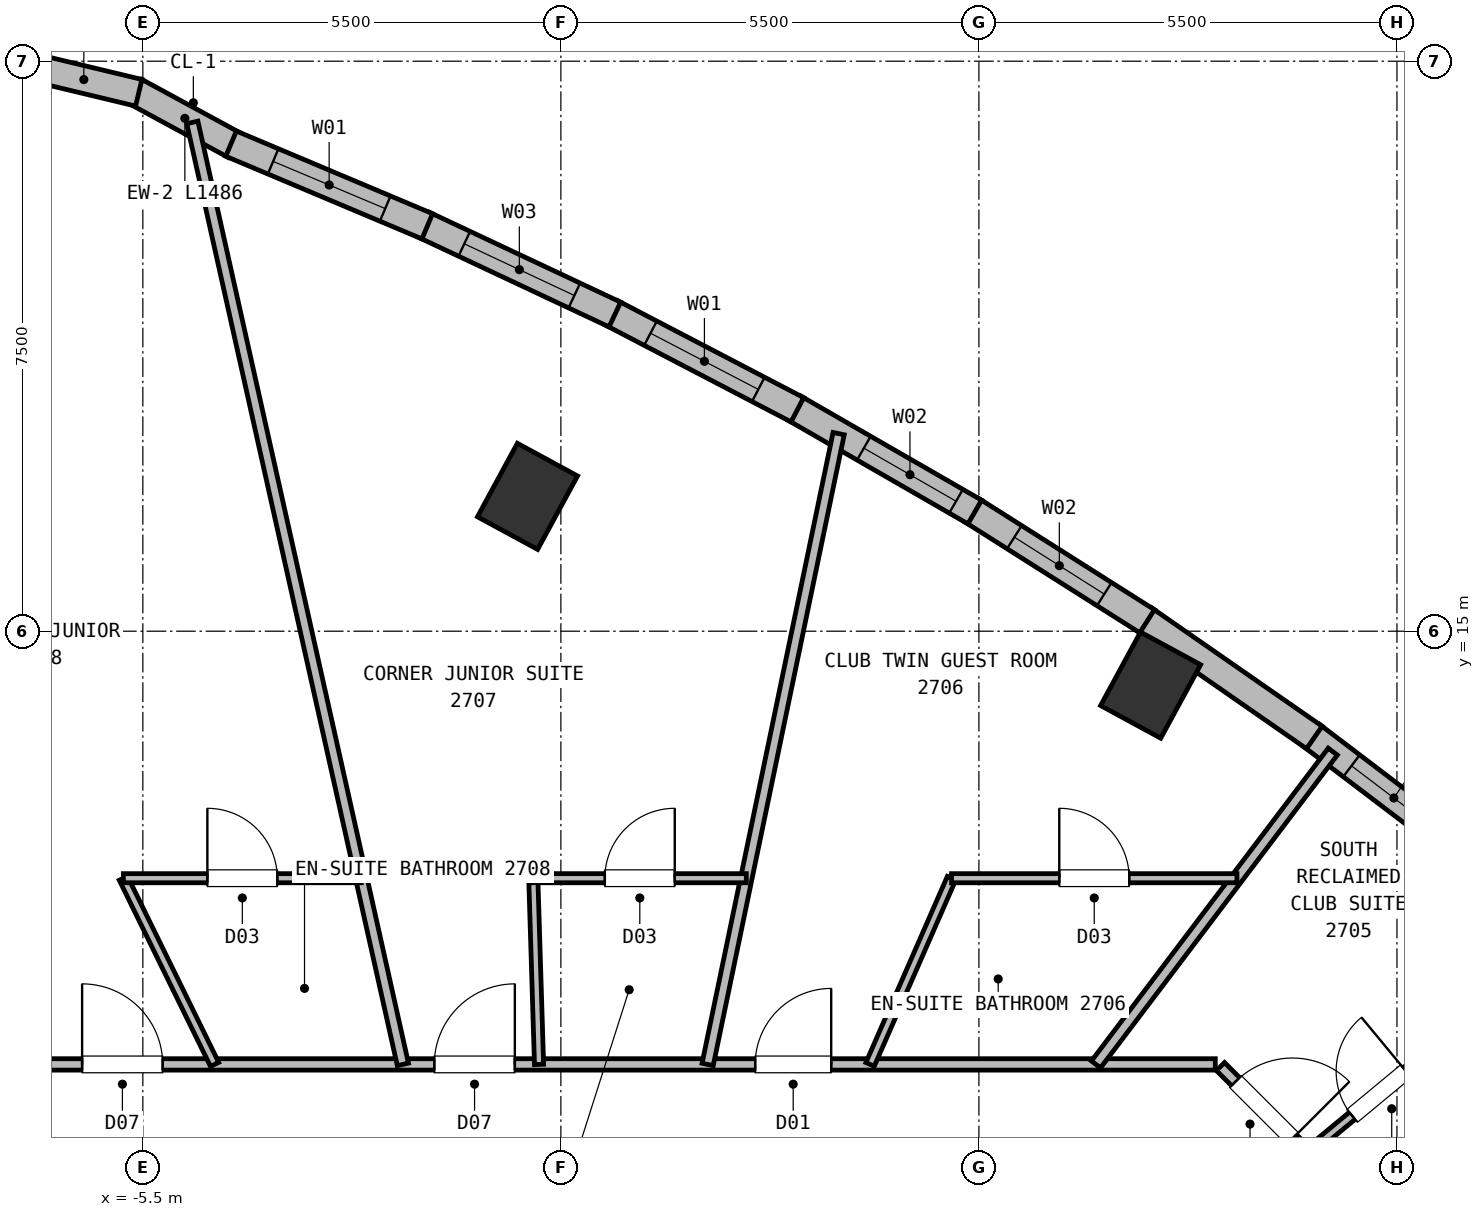
"""IFC4 building model, lengths in metres.
Left out: names, types, materials, properties, quantities, classifications, styles, units other than length and angle.
Written with IfcOpenShell. Run it as: python <this file> out.ifc"""

import sys

from ifc_helpers import new_model, si_unit, direction, frame, frame_2d, origin, origin_2d, place, context, subcontext, project, spatial, rectangle, extrude, element, fill, save


model = new_model("IFC4")
c1 = context("Model", 3, precision=1e-05, world=origin(), true_north=direction((0.0, 1.0)))
c2 = subcontext(c1, "Body", "Model", "MODEL_VIEW")
j1 = project(units=[si_unit("LENGTHUNIT", "METRE"), si_unit("PLANEANGLEUNIT", "RADIAN")], contexts=[c1])
p1 = place(None, origin())
s1 = spatial("IfcSite", under=j1, at=p1, CompositionType="ELEMENT")
p2 = place(p1, origin())
s2 = spatial("IfcBuilding", under=s1, at=p2, CompositionType="ELEMENT")
p3 = place(p2, frame((0.0, 0.0, 101.0)))
s3 = spatial("IfcBuildingStorey", under=s2, at=p3, CompositionType="ELEMENT", Elevation=101.0)
for number, where, z_axis, x_axis in (
    (1, (7.759, 14.29, 0.0), (0.0, 0.0, 1.0), (-0.879, 0.477, 0.0)),
    (2, (-0.439, 16.774, 0.0), (0.0, 0.0, 1.0), (-0.879, 0.477, 0.0)),
):
    element("IfcColumn", number, at=place(p3, frame(where, z_axis=z_axis, x_axis=x_axis)), inside=s3, PredefinedType="COLUMN", context=c2, shape_type="SweptSolid", body=[
        extrude(rectangle(XDim=0.9, YDim=1.1, at=origin_2d()), origin(), (0.0, 0.0, 1.0), 3.75),
    ])
for number, where, z_axis, x_axis in (
    (3, (-5.6, 22.102, 0.0), (0.0, 0.0, 1.0), (0.879, -0.477, 0.0)),
    (4, (-6.999, 22.431, 0.0), (0.0, 0.0, 1.0), (0.972, -0.233, 0.0)),
):
    element("IfcWall", number, at=place(p3, frame(where, z_axis=z_axis, x_axis=x_axis)), inside=s3, PredefinedType="SOLIDWALL", context=c2, shape_type="SweptSolid", body=[
        extrude(rectangle(XDim=1.486, YDim=0.36, at=frame_2d((0.743, 0.0))), origin(), (0.0, 0.0, 1.0), 3.5),
    ])
p4 = place(p3, frame((9.873, 13.631, 0.0), z_axis=(0.0, 0.0, 1.0), x_axis=(0.796336225349, -0.604854210696, 0.0)))
e5 = element("IfcWall", 5, at=p4, inside=s3, PredefinedType="SOLIDWALL", context=c2, shape_type="SweptSolid", body=[
    extrude(rectangle(XDim=2.73, YDim=0.36, at=frame_2d((1.365, 0.0))), origin(), (0.0, 0.0, 1.0), 3.5),
])
p5 = place(p4, frame((0.665, 0.0, 0.72)))
e6 = element("IfcOpeningElement", 6, at=p5, cuts=e5, PredefinedType="OPENING", context=c2, shape_type="SweptSolid", body=[
    extrude(rectangle(XDim=1.4, YDim=1.84, at=frame_2d((0.7, 0.92))), frame((0.0, 0.19, 0.0), z_axis=(0.0, -1.0, 0.0), x_axis=(1.0, 0.0, 0.0)), (0.0, 0.0, 1.0), 0.38),
])
p6 = place(p3, frame((7.671, 15.159, 0.0), z_axis=(0.0, 0.0, 1.0), x_axis=(0.821331552378, -0.570451120665, 0.0)))
e7 = element("IfcWall", 7, at=p6, inside=s3, PredefinedType="SOLIDWALL", context=c2, shape_type="SweptSolid", body=[
    extrude(rectangle(XDim=2.73, YDim=0.36, at=frame_2d((1.365, 0.0))), origin(), (0.0, 0.0, 1.0), 3.5),
])
p7 = place(p3, frame((5.403, 16.594, 0.0), z_axis=(0.0, 0.0, 1.0), x_axis=(0.844802931873, -0.535077570357, 0.0)))
e8 = element("IfcWall", 8, at=p7, inside=s3, PredefinedType="SOLIDWALL", context=c2, shape_type="SweptSolid", body=[
    extrude(rectangle(XDim=2.734, YDim=0.36, at=frame_2d((1.367, 0.0))), origin(), (0.0, 0.0, 1.0), 3.5),
])
p8 = place(p7, frame((0.667, 0.0, 0.72)))
e9 = element("IfcOpeningElement", 9, at=p8, cuts=e8, PredefinedType="OPENING", context=c2, shape_type="SweptSolid", body=[
    extrude(rectangle(XDim=1.4, YDim=1.84, at=frame_2d((0.7, 0.92))), frame((0.0, 0.19, 0.0), z_axis=(0.0, -1.0, 0.0), x_axis=(1.0, 0.0, 0.0)), (0.0, 0.0, 1.0), 0.38),
])
p9 = place(p3, frame((3.068, 17.938, 0.0), z_axis=(0.0, 0.0, 1.0), x_axis=(0.866601472799, -0.499000889121, 0.0)))
e10 = element("IfcWall", 10, at=p9, inside=s3, PredefinedType="SOLIDWALL", context=c2, shape_type="SweptSolid", body=[
    extrude(rectangle(XDim=2.744, YDim=0.36, at=frame_2d((1.372, 0.0))), origin(), (0.0, 0.0, 1.0), 3.5),
])
p10 = place(p9, frame((1.06, 0.0, 0.72)))
e11 = element("IfcOpeningElement", 11, at=p10, cuts=e10, PredefinedType="OPENING", context=c2, shape_type="SweptSolid", body=[
    extrude(rectangle(XDim=1.4, YDim=1.84, at=frame_2d((0.7, 0.92))), frame((0.0, 0.19, 0.0), z_axis=(0.0, -1.0, 0.0), x_axis=(1.0, 0.0, 0.0)), (0.0, 0.0, 1.0), 0.38),
])
p11 = place(p3, frame((0.666, 19.189, 0.0), z_axis=(0.0, 0.0, 1.0), x_axis=(0.886704748188, -0.462336121822, 0.0)))
e12 = element("IfcWall", 12, at=p11, inside=s3, PredefinedType="SOLIDWALL", context=c2, shape_type="SweptSolid", body=[
    extrude(rectangle(XDim=2.759, YDim=0.36, at=frame_2d((1.379, 0.0))), origin(), (0.0, 0.0, 1.0), 3.5),
])
p12 = place(p11, frame((0.579, 0.0, 0.72)))
e13 = element("IfcOpeningElement", 13, at=p12, cuts=e12, PredefinedType="OPENING", context=c2, shape_type="SweptSolid", body=[
    extrude(rectangle(XDim=1.6, YDim=1.88, at=frame_2d((0.8, 0.94))), frame((0.0, 0.19, 0.0), z_axis=(0.0, -1.0, 0.0), x_axis=(1.0, 0.0, 0.0)), (0.0, 0.0, 1.0), 0.38),
])
p13 = place(p3, frame((-1.803, 20.348, 0.0), z_axis=(0.0, 0.0, 1.0), x_axis=(0.905061598697, -0.425280498688, 0.0)))
e14 = element("IfcWall", 14, at=p13, inside=s3, PredefinedType="SOLIDWALL", context=c2, shape_type="SweptSolid", body=[
    extrude(rectangle(XDim=2.777, YDim=0.36, at=frame_2d((1.389, 0.0))), origin(), (0.0, 0.0, 1.0), 3.5),
])
p14 = place(p13, frame((0.589, 0.0, 0.72)))
e15 = element("IfcOpeningElement", 15, at=p14, cuts=e14, PredefinedType="OPENING", context=c2, shape_type="SweptSolid", body=[
    extrude(rectangle(XDim=1.6, YDim=1.88, at=frame_2d((0.8, 0.94))), frame((0.0, 0.19, 0.0), z_axis=(0.0, -1.0, 0.0), x_axis=(1.0, 0.0, 0.0)), (0.0, 0.0, 1.0), 0.38),
])
p15 = place(p3, frame((-4.339, 21.415, 0.0), z_axis=(0.0, 0.0, 1.0), x_axis=(0.921579586259, -0.388189472025, 0.0)))
e16 = element("IfcWall", 16, at=p15, inside=s3, PredefinedType="SOLIDWALL", context=c2, shape_type="SweptSolid", body=[
    extrude(rectangle(XDim=2.801, YDim=0.36, at=frame_2d((1.401, 0.0))), origin(), (0.0, 0.0, 1.0), 3.5),
])
p16 = place(p15, frame((0.601, 0.0, 0.72)))
e17 = element("IfcOpeningElement", 17, at=p16, cuts=e16, PredefinedType="OPENING", context=c2, shape_type="SweptSolid", body=[
    extrude(rectangle(XDim=1.6, YDim=1.88, at=frame_2d((0.8, 0.94))), frame((0.0, 0.19, 0.0), z_axis=(0.0, -1.0, 0.0), x_axis=(1.0, 0.0, 0.0)), (0.0, 0.0, 1.0), 0.38),
])
p17 = place(p3, frame((8.678, 9.272, 0.0), z_axis=(0.0, 0.0, 1.0), x_axis=(0.707106781187, -0.707106781187, 0.0)))
e18 = element("IfcWall", 18, at=p17, inside=s3, PredefinedType="PARTITIONING", context=c2, shape_type="SweptSolid", body=[
    extrude(rectangle(XDim=2.89, YDim=0.15, at=frame_2d((1.445, 0.0))), origin(), (0.0, 0.0, 1.0), 3.5),
])
p18 = place(p17, frame((0.28, 0.0, 0.0)))
e19 = element("IfcOpeningElement", 19, at=p18, cuts=e18, PredefinedType="OPENING", context=c2, shape_type="SweptSolid", body=[
    extrude(rectangle(XDim=1.06, YDim=2.15, at=frame_2d((0.53, 1.075))), frame((0.0, 0.085, 0.0), z_axis=(0.0, -1.0, 0.0), x_axis=(1.0, 0.0, 0.0)), (0.0, 0.0, 1.0), 0.17),
])
p19 = place(p3, frame((-8.61, 9.3, 0.0), z_axis=(0.0, 0.0, 1.0), x_axis=(1.0, 0.0, 0.0)))
e20 = element("IfcWall", 20, at=p19, inside=s3, PredefinedType="PARTITIONING", context=c2, shape_type="SweptSolid", body=[
    extrude(rectangle(XDim=17.22, YDim=0.15, at=frame_2d((8.61, 0.0))), origin(), (0.0, 0.0, 1.0), 3.5),
])
p20 = place(p19, frame((11.167, 0.0, 0.0)))
e21 = element("IfcOpeningElement", 21, at=p20, cuts=e20, PredefinedType="OPENING", context=c2, shape_type="SweptSolid", body=[
    extrude(rectangle(XDim=1.0, YDim=2.15, at=frame_2d((0.5, 1.075))), frame((0.0, 0.085, 0.0), z_axis=(0.0, -1.0, 0.0), x_axis=(1.0, 0.0, 0.0)), (0.0, 0.0, 1.0), 0.17),
])
p21 = place(p19, frame((6.944, 0.0, 0.0)))
e22 = element("IfcOpeningElement", 22, at=p21, cuts=e20, PredefinedType="OPENING", context=c2, shape_type="SweptSolid", body=[
    extrude(rectangle(XDim=1.06, YDim=2.15, at=frame_2d((0.53, 1.075))), frame((0.0, 0.085, 0.0), z_axis=(0.0, -1.0, 0.0), x_axis=(1.0, 0.0, 0.0)), (0.0, 0.0, 1.0), 0.17),
])
p22 = place(p19, frame((2.311, 0.0, 0.0)))
e23 = element("IfcOpeningElement", 23, at=p22, cuts=e20, PredefinedType="OPENING", context=c2, shape_type="SweptSolid", body=[
    extrude(rectangle(XDim=1.06, YDim=2.15, at=frame_2d((0.53, 1.075))), frame((0.0, 0.085, 0.0), z_axis=(0.0, -1.0, 0.0), x_axis=(1.0, 0.0, 0.0)), (0.0, 0.0, 1.0), 0.17),
])
p23 = place(p3, frame((9.818, 8.132, 0.0), z_axis=(0.0, 0.0, 1.0), x_axis=(0.770088402747, 0.63793718496, 0.0)))
e24 = element("IfcWall", 24, at=p23, inside=s3, PredefinedType="PARTITIONING", context=c2, shape_type="SweptSolid", body=[
    extrude(rectangle(XDim=2.461, YDim=0.12, at=frame_2d((1.23, 0.0))), origin(), (0.0, 0.0, 1.0), 3.5),
])
p24 = place(p23, frame((0.771, 0.0, 0.0)))
e25 = element("IfcOpeningElement", 25, at=p24, cuts=e24, PredefinedType="OPENING", context=c2, shape_type="SweptSolid", body=[
    extrude(rectangle(XDim=0.92, YDim=2.1, at=frame_2d((0.46, 1.05))), frame((0.0, 0.07, 0.0), z_axis=(0.0, -1.0, 0.0), x_axis=(1.0, 0.0, 0.0)), (0.0, 0.0, 1.0), 0.14),
])
p25 = place(p3, frame((7.04, 9.3, 0.0), z_axis=(0.0, 0.0, 1.0), x_axis=(0.603580834167, 0.797301810249, 0.0)))
e26 = element("IfcWall", 26, at=p25, inside=s3, PredefinedType="PARTITIONING", context=c2, shape_type="SweptSolid", body=[
    extrude(rectangle(XDim=5.162, YDim=0.15, at=frame_2d((2.581, 0.0))), origin(), (0.0, 0.0, 1.0), 3.5),
])
p26 = place(p3, frame((4.068, 9.3, 0.0), z_axis=(0.0, 0.0, 1.0), x_axis=(0.400794887066, 0.916167811322, 0.0)))
e27 = element("IfcWall", 27, at=p26, inside=s3, PredefinedType="PARTITIONING", context=c2, shape_type="SweptSolid", body=[
    extrude(rectangle(XDim=2.674, YDim=0.12, at=frame_2d((1.337, 0.0))), origin(), (0.0, 0.0, 1.0), 3.5),
])
p27 = place(p3, frame((5.14, 11.75, 0.0), z_axis=(0.0, 0.0, 1.0), x_axis=(1.0, 0.0, 0.0)))
e28 = element("IfcWall", 28, at=p27, inside=s3, PredefinedType="PARTITIONING", context=c2, shape_type="SweptSolid", body=[
    extrude(rectangle(XDim=3.755, YDim=0.12, at=frame_2d((1.877, 0.0))), origin(), (0.0, 0.0, 1.0), 3.5),
])
p28 = place(p27, frame((1.417, 0.0, 0.0)))
e29 = element("IfcOpeningElement", 29, at=p28, cuts=e28, PredefinedType="OPENING", context=c2, shape_type="SweptSolid", body=[
    extrude(rectangle(XDim=0.92, YDim=2.1, at=frame_2d((0.46, 1.05))), frame((0.0, 0.07, 0.0), z_axis=(0.0, -1.0, 0.0), x_axis=(1.0, 0.0, 0.0)), (0.0, 0.0, 1.0), 0.14),
])
p29 = place(p3, frame((1.931, 9.3, 0.0), z_axis=(0.0, 0.0, 1.0), x_axis=(0.203305542184, 0.979115343827, 0.0)))
e30 = element("IfcWall", 30, at=p29, inside=s3, PredefinedType="PARTITIONING", context=c2, shape_type="SweptSolid", body=[
    extrude(rectangle(XDim=8.477, YDim=0.15, at=frame_2d((4.238, 0.0))), origin(), (0.0, 0.0, 1.0), 3.5),
])
p30 = place(p3, frame((-0.287, 9.3, 0.0), z_axis=(0.0, 0.0, 1.0), x_axis=(-0.030877148781, 0.999523187166, 0.0)))
e31 = element("IfcWall", 31, at=p30, inside=s3, PredefinedType="PARTITIONING", context=c2, shape_type="SweptSolid", body=[
    extrude(rectangle(XDim=2.451, YDim=0.12, at=frame_2d((1.226, 0.0))), origin(), (0.0, 0.0, 1.0), 3.5),
])
p31 = place(p3, frame((-0.363, 11.75, 0.0), z_axis=(0.0, 0.0, 1.0), x_axis=(1.0, 0.0, 0.0)))
e32 = element("IfcWall", 32, at=p31, inside=s3, PredefinedType="PARTITIONING", context=c2, shape_type="SweptSolid", body=[
    extrude(rectangle(XDim=2.803, YDim=0.12, at=frame_2d((1.401, 0.0))), origin(), (0.0, 0.0, 1.0), 3.5),
])
p32 = place(p31, frame((0.941, 0.0, 0.0)))
e33 = element("IfcOpeningElement", 33, at=p32, cuts=e32, PredefinedType="OPENING", context=c2, shape_type="SweptSolid", body=[
    extrude(rectangle(XDim=0.92, YDim=2.1, at=frame_2d((0.46, 1.05))), frame((0.0, 0.07, 0.0), z_axis=(0.0, -1.0, 0.0), x_axis=(1.0, 0.0, 0.0)), (0.0, 0.0, 1.0), 0.14),
])
p33 = place(p3, frame((-2.079, 9.3, 0.0), z_axis=(0.0, 0.0, 1.0), x_axis=(-0.218143379007, 0.975916731179, 0.0)))
e34 = element("IfcWall", 34, at=p33, inside=s3, PredefinedType="PARTITIONING", context=c2, shape_type="SweptSolid", body=[
    extrude(rectangle(XDim=12.7, YDim=0.15, at=frame_2d((6.35, 0.0))), origin(), (0.0, 0.0, 1.0), 3.5),
])
p34 = place(p3, frame((-5.756, 11.75, 0.0), z_axis=(0.0, 0.0, 1.0), x_axis=(0.439932257938, -0.898030961841, 0.0)))
e35 = element("IfcWall", 35, at=p34, inside=s3, PredefinedType="PARTITIONING", context=c2, shape_type="SweptSolid", body=[
    extrude(rectangle(XDim=2.728, YDim=0.12, at=frame_2d((1.364, 0.0))), origin(), (0.0, 0.0, 1.0), 3.5),
])
p35 = place(p3, frame((-5.756, 11.75, 0.0), z_axis=(0.0, 0.0, 1.0), x_axis=(1.0, 0.0, 0.0)))
e36 = element("IfcWall", 36, at=p35, inside=s3, PredefinedType="PARTITIONING", context=c2, shape_type="SweptSolid", body=[
    extrude(rectangle(XDim=3.13, YDim=0.12, at=frame_2d((1.565, 0.0))), origin(), (0.0, 0.0, 1.0), 3.5),
])
p36 = place(p35, frame((1.105, 0.0, 0.0)))
e37 = element("IfcOpeningElement", 37, at=p36, cuts=e36, PredefinedType="OPENING", context=c2, shape_type="SweptSolid", body=[
    extrude(rectangle(XDim=0.92, YDim=2.1, at=frame_2d((0.46, 1.05))), frame((0.0, 0.07, 0.0), z_axis=(0.0, -1.0, 0.0), x_axis=(1.0, 0.0, 0.0)), (0.0, 0.0, 1.0), 0.14),
])
p37 = place(p5, origin())
e38 = element("IfcWindow", 38, at=p37, inside=s3, PartitioningType="SINGLE_PANEL", PredefinedType="WINDOW", context=c2, shape_type="SweptSolid", body=[
    extrude(rectangle(XDim=1.4, YDim=1.84, at=frame_2d((0.7, 0.92))), frame((0.0, 0.03, 0.0), z_axis=(0.0, -1.0, 0.0), x_axis=(1.0, 0.0, 0.0)), (0.0, 0.0, 1.0), 0.06),
])
fill(e6, e38)
p38 = place(p8, origin())
e39 = element("IfcWindow", 39, at=p38, inside=s3, PartitioningType="SINGLE_PANEL", PredefinedType="WINDOW", context=c2, shape_type="SweptSolid", body=[
    extrude(rectangle(XDim=1.4, YDim=1.84, at=frame_2d((0.7, 0.92))), frame((0.0, 0.03, 0.0), z_axis=(0.0, -1.0, 0.0), x_axis=(1.0, 0.0, 0.0)), (0.0, 0.0, 1.0), 0.06),
])
fill(e9, e39)
p39 = place(p10, origin())
e40 = element("IfcWindow", 40, at=p39, inside=s3, PartitioningType="SINGLE_PANEL", PredefinedType="WINDOW", context=c2, shape_type="SweptSolid", body=[
    extrude(rectangle(XDim=1.4, YDim=1.84, at=frame_2d((0.7, 0.92))), frame((0.0, 0.03, 0.0), z_axis=(0.0, -1.0, 0.0), x_axis=(1.0, 0.0, 0.0)), (0.0, 0.0, 1.0), 0.06),
])
fill(e11, e40)
p40 = place(p12, origin())
e41 = element("IfcWindow", 41, at=p40, inside=s3, PartitioningType="SINGLE_PANEL", PredefinedType="WINDOW", context=c2, shape_type="SweptSolid", body=[
    extrude(rectangle(XDim=1.6, YDim=1.88, at=frame_2d((0.8, 0.94))), frame((0.0, 0.03, 0.0), z_axis=(0.0, -1.0, 0.0), x_axis=(1.0, 0.0, 0.0)), (0.0, 0.0, 1.0), 0.06),
])
fill(e13, e41)
p41 = place(p14, origin())
e42 = element("IfcWindow", 42, at=p41, inside=s3, PartitioningType="SINGLE_PANEL", PredefinedType="WINDOW", context=c2, shape_type="SweptSolid", body=[
    extrude(rectangle(XDim=1.6, YDim=1.88, at=frame_2d((0.8, 0.94))), frame((0.0, 0.03, 0.0), z_axis=(0.0, -1.0, 0.0), x_axis=(1.0, 0.0, 0.0)), (0.0, 0.0, 1.0), 0.06),
])
fill(e15, e42)
p42 = place(p16, origin())
e43 = element("IfcWindow", 43, at=p42, inside=s3, PartitioningType="SINGLE_PANEL", PredefinedType="WINDOW", context=c2, shape_type="SweptSolid", body=[
    extrude(rectangle(XDim=1.6, YDim=1.88, at=frame_2d((0.8, 0.94))), frame((0.0, 0.03, 0.0), z_axis=(0.0, -1.0, 0.0), x_axis=(1.0, 0.0, 0.0)), (0.0, 0.0, 1.0), 0.06),
])
fill(e17, e43)
p43 = place(p24, origin())
e44 = element("IfcDoor", 44, at=p43, inside=s3, OperationType="SINGLE_SWING_RIGHT", PredefinedType="DOOR", context=c2, shape_type="SweptSolid", body=[
    extrude(rectangle(XDim=0.92, YDim=2.1, at=frame_2d((0.46, 1.05))), frame((0.0, 0.025, 0.0), z_axis=(0.0, -1.0, 0.0), x_axis=(1.0, 0.0, 0.0)), (0.0, 0.0, 1.0), 0.05),
])
fill(e25, e44)
p44 = place(p28, origin())
e45 = element("IfcDoor", 45, at=p44, inside=s3, OperationType="SINGLE_SWING_LEFT", PredefinedType="DOOR", context=c2, shape_type="SweptSolid", body=[
    extrude(rectangle(XDim=0.92, YDim=2.1, at=frame_2d((0.46, 1.05))), frame((0.0, 0.025, 0.0), z_axis=(0.0, -1.0, 0.0), x_axis=(1.0, 0.0, 0.0)), (0.0, 0.0, 1.0), 0.05),
])
fill(e29, e45)
p45 = place(p32, origin())
e46 = element("IfcDoor", 46, at=p45, inside=s3, OperationType="SINGLE_SWING_RIGHT", PredefinedType="DOOR", context=c2, shape_type="SweptSolid", body=[
    extrude(rectangle(XDim=0.92, YDim=2.1, at=frame_2d((0.46, 1.05))), frame((0.0, 0.025, 0.0), z_axis=(0.0, -1.0, 0.0), x_axis=(1.0, 0.0, 0.0)), (0.0, 0.0, 1.0), 0.05),
])
fill(e33, e46)
p46 = place(p36, origin())
e47 = element("IfcDoor", 47, at=p46, inside=s3, OperationType="SINGLE_SWING_LEFT", PredefinedType="DOOR", context=c2, shape_type="SweptSolid", body=[
    extrude(rectangle(XDim=0.92, YDim=2.1, at=frame_2d((0.46, 1.05))), frame((0.0, 0.025, 0.0), z_axis=(0.0, -1.0, 0.0), x_axis=(1.0, 0.0, 0.0)), (0.0, 0.0, 1.0), 0.05),
])
fill(e37, e47)
p47 = place(p18, origin())
e48 = element("IfcDoor", 48, at=p47, inside=s3, OperationType="SINGLE_SWING_RIGHT", PredefinedType="DOOR", context=c2, shape_type="SweptSolid", body=[
    extrude(rectangle(XDim=1.06, YDim=2.15, at=frame_2d((0.53, 1.075))), frame((0.0, 0.025, 0.0), z_axis=(0.0, -1.0, 0.0), x_axis=(1.0, 0.0, 0.0)), (0.0, 0.0, 1.0), 0.05),
])
fill(e19, e48)
p48 = place(p20, origin())
e49 = element("IfcDoor", 49, at=p48, inside=s3, OperationType="SINGLE_SWING_RIGHT", PredefinedType="DOOR", context=c2, shape_type="SweptSolid", body=[
    extrude(rectangle(XDim=1.0, YDim=2.15, at=frame_2d((0.5, 1.075))), frame((0.0, 0.025, 0.0), z_axis=(0.0, -1.0, 0.0), x_axis=(1.0, 0.0, 0.0)), (0.0, 0.0, 1.0), 0.05),
])
fill(e21, e49)
p49 = place(p21, origin())
e50 = element("IfcDoor", 50, at=p49, inside=s3, OperationType="SINGLE_SWING_RIGHT", PredefinedType="DOOR", context=c2, shape_type="SweptSolid", body=[
    extrude(rectangle(XDim=1.06, YDim=2.15, at=frame_2d((0.53, 1.075))), frame((0.0, 0.025, 0.0), z_axis=(0.0, -1.0, 0.0), x_axis=(1.0, 0.0, 0.0)), (0.0, 0.0, 1.0), 0.05),
])
fill(e22, e50)
p50 = place(p22, origin())
e51 = element("IfcDoor", 51, at=p50, inside=s3, OperationType="SINGLE_SWING_LEFT", PredefinedType="DOOR", context=c2, shape_type="SweptSolid", body=[
    extrude(rectangle(XDim=1.06, YDim=2.15, at=frame_2d((0.53, 1.075))), frame((0.0, 0.025, 0.0), z_axis=(0.0, -1.0, 0.0), x_axis=(1.0, 0.0, 0.0)), (0.0, 0.0, 1.0), 0.05),
])
fill(e23, e51)
save(model, sys.argv[1])
